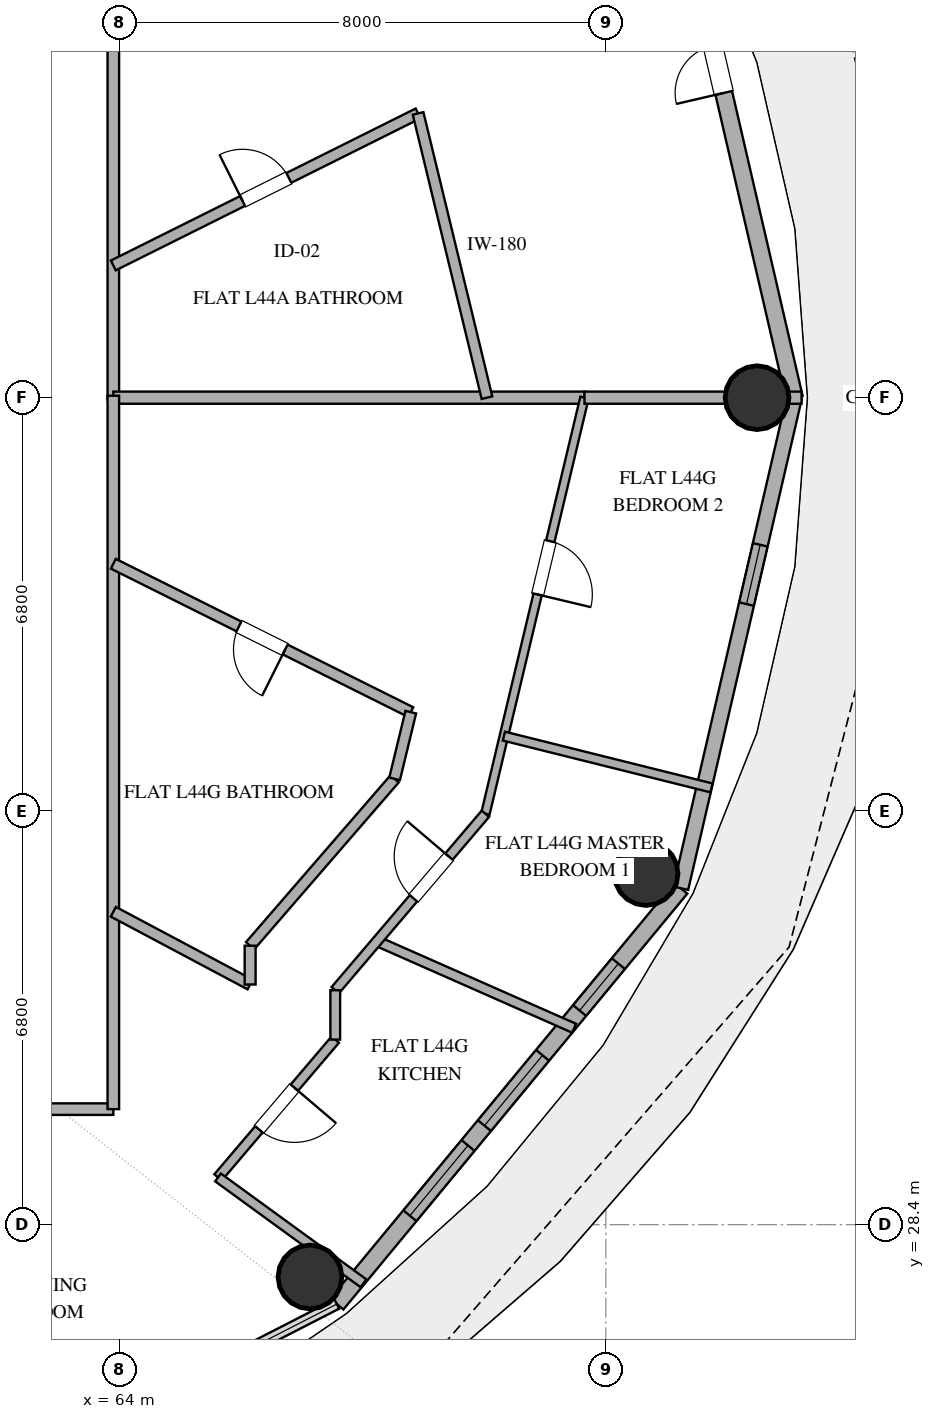
"""IFC4 building model, lengths in metres.
Left out: names, types, materials, properties, quantities, classifications, styles, units other than length and angle.
Written with IfcOpenShell. Run it as: python <this file> out.ifc"""

import sys

from ifc_helpers import new_model, si_unit, direction, frame, frame_2d, origin, origin_2d, place, context, subcontext, project, spatial, rectangle, hollow_circle, extrude, element, fill, save


model = new_model("IFC4")
c1 = context("Model", 3, precision=1e-05, world=origin(), true_north=direction((0.0, 1.0)))
c2 = subcontext(c1, "Body", "Model", "MODEL_VIEW")
j1 = project(units=[si_unit("LENGTHUNIT", "METRE"), si_unit("PLANEANGLEUNIT", "RADIAN")], contexts=[c1])
p1 = place(None, origin())
s1 = spatial("IfcSite", under=j1, at=p1, CompositionType="ELEMENT")
p2 = place(p1, origin())
s2 = spatial("IfcBuilding", under=s1, at=p2, CompositionType="ELEMENT")
p3 = place(p2, frame((0.0, 0.0, 175.8)))
s3 = spatial("IfcBuildingStorey", under=s2, at=p3, CompositionType="ELEMENT", Elevation=175.8)
for number, where, z_axis, x_axis in (
    (1, (74.487, 42.0, 0.0), (0.0, 0.0, 1.0), (1.0, 0.0, 0.0)),
    (2, (67.134, 27.54, 0.0), (0.0, 0.0, 1.0), (1.0, 0.0, 0.0)),
    (3, (72.662, 34.174, 0.0), (0.0, 0.0, 1.0), (1.0, 0.0, 0.0)),
):
    element("IfcColumn", number, at=place(p3, frame(where, z_axis=z_axis, x_axis=x_axis)), inside=s3, PredefinedType="COLUMN", context=c2, shape_type="SweptSolid", body=[
        extrude(hollow_circle(Radius=0.525, WallThickness=0.028, at=origin_2d()), origin(), (0.0, 0.0, 1.0), 3.38),
    ])
p4 = place(p3, frame((75.099, 42.0, 0.0), z_axis=(0.0, 0.0, 1.0), x_axis=(-0.225473184558, 0.974249374157, 0.0)))
e4 = element("IfcWall", 4, at=p4, inside=s3, PredefinedType="SOLIDWALL", context=c2, shape_type="SweptSolid", body=[
    extrude(rectangle(XDim=8.28, YDim=0.28, at=frame_2d((4.14, 0.0))), origin(), (0.0, 0.0, 1.0), 3.38),
])
p5 = place(p4, frame((5.144, 0.0, 0.0)))
e5 = element("IfcOpeningElement", 5, at=p5, cuts=e4, PredefinedType="OPENING", context=c2, shape_type="SweptSolid", body=[
    extrude(rectangle(XDim=1.6, YDim=2.25, at=frame_2d((0.8, 1.125))), frame((0.0, 0.15, 0.0), z_axis=(0.0, -1.0, 0.0), x_axis=(1.0, 0.0, 0.0)), (0.0, 0.0, 1.0), 0.3),
])
p6 = place(p3, frame((67.576, 27.094, 0.0), z_axis=(0.0, 0.0, 1.0), x_axis=(0.637333477683, 0.770588111915, 0.0)))
e6 = element("IfcWall", 6, at=p6, inside=s3, PredefinedType="SOLIDWALL", context=c2, shape_type="SweptSolid", body=[
    extrude(rectangle(XDim=8.875, YDim=0.28, at=frame_2d((4.438, 0.0))), origin(), (0.0, 0.0, 1.0), 3.38),
])
p7 = place(p6, frame((1.885, 0.0, 0.85)))
e7 = element("IfcOpeningElement", 7, at=p7, cuts=e6, PredefinedType="OPENING", context=c2, shape_type="SweptSolid", body=[
    extrude(rectangle(XDim=1.5, YDim=2.0, at=frame_2d((0.75, 1.0))), frame((0.0, 0.15, 0.0), z_axis=(0.0, -1.0, 0.0), x_axis=(1.0, 0.0, 0.0)), (0.0, 0.0, 1.0), 0.3),
])
p8 = place(p6, frame((3.809, 0.0, 0.85)))
e8 = element("IfcOpeningElement", 8, at=p8, cuts=e6, PredefinedType="OPENING", context=c2, shape_type="SweptSolid", body=[
    extrude(rectangle(XDim=1.5, YDim=2.0, at=frame_2d((0.75, 1.0))), frame((0.0, 0.15, 0.0), z_axis=(0.0, -1.0, 0.0), x_axis=(1.0, 0.0, 0.0)), (0.0, 0.0, 1.0), 0.3),
])
p9 = place(p6, frame((6.265, 0.0, 0.85)))
e9 = element("IfcOpeningElement", 9, at=p9, cuts=e6, PredefinedType="OPENING", context=c2, shape_type="SweptSolid", body=[
    extrude(rectangle(XDim=1.0, YDim=1.8, at=frame_2d((0.5, 0.9))), frame((0.0, 0.15, 0.0), z_axis=(0.0, -1.0, 0.0), x_axis=(1.0, 0.0, 0.0)), (0.0, 0.0, 1.0), 0.3),
])
p10 = place(p3, frame((73.232, 33.933, 0.0), z_axis=(0.0, 0.0, 1.0), x_axis=(0.225473184558, 0.974249374157, 0.0)))
e10 = element("IfcWall", 10, at=p10, inside=s3, PredefinedType="SOLIDWALL", context=c2, shape_type="SweptSolid", body=[
    extrude(rectangle(XDim=8.28, YDim=0.25, at=frame_2d((4.14, 0.0))), origin(), (0.0, 0.0, 1.0), 3.38),
])
p11 = place(p10, frame((4.797, 0.0, 0.35)))
e11 = element("IfcOpeningElement", 11, at=p11, cuts=e10, PredefinedType="OPENING", context=c2, shape_type="SweptSolid", body=[
    extrude(rectangle(XDim=1.0, YDim=1.05, at=frame_2d((0.5, 0.525))), frame((0.0, 0.135, 0.0), z_axis=(0.0, -1.0, 0.0), x_axis=(1.0, 0.0, 0.0)), (0.0, 0.0, 1.0), 0.27),
])
p12 = place(p3, frame((44.873, 30.3, 0.0), z_axis=(0.0, 0.0, 1.0), x_axis=(1.0, 0.0, 0.0)))
e12 = element("IfcWall", 12, at=p12, inside=s3, PredefinedType="PARTITIONING", context=c2, shape_type="SweptSolid", body=[
    extrude(rectangle(XDim=19.027, YDim=0.19, at=frame_2d((9.514, 0.0))), origin(), (0.0, 0.0, 1.0), 2.74),
])
p13 = place(p12, frame((5.01, 0.0, 0.0)))
e13 = element("IfcOpeningElement", 13, at=p13, cuts=e12, PredefinedType="OPENING", context=c2, shape_type="SweptSolid", body=[
    extrude(rectangle(XDim=1.0, YDim=2.2, at=frame_2d((0.5, 1.1))), frame((0.0, 0.105, 0.0), z_axis=(0.0, -1.0, 0.0), x_axis=(1.0, 0.0, 0.0)), (0.0, 0.0, 1.0), 0.21),
])
p14 = place(p12, frame((14.504, 0.0, 0.0)))
e14 = element("IfcOpeningElement", 14, at=p14, cuts=e12, PredefinedType="OPENING", context=c2, shape_type="SweptSolid", body=[
    extrude(rectangle(XDim=1.0, YDim=2.2, at=frame_2d((0.5, 1.1))), frame((0.0, 0.105, 0.0), z_axis=(0.0, -1.0, 0.0), x_axis=(1.0, 0.0, 0.0)), (0.0, 0.0, 1.0), 0.21),
])
p15 = place(p3, frame((63.9, 53.7, 0.0), z_axis=(0.0, 0.0, 1.0), x_axis=(0.0, -1.0, 0.0)))
e15 = element("IfcWall", 15, at=p15, inside=s3, PredefinedType="PARTITIONING", context=c2, shape_type="SweptSolid", body=[
    extrude(rectangle(XDim=11.732, YDim=0.19, at=frame_2d((5.866, 0.0))), origin(), (0.0, 0.0, 1.0), 2.74),
])
p16 = place(p15, frame((4.281, 0.0, 0.0)))
e16 = element("IfcOpeningElement", 16, at=p16, cuts=e15, PredefinedType="OPENING", context=c2, shape_type="SweptSolid", body=[
    extrude(rectangle(XDim=1.0, YDim=2.2, at=frame_2d((0.5, 1.1))), frame((0.0, 0.105, 0.0), z_axis=(0.0, -1.0, 0.0), x_axis=(1.0, 0.0, 0.0)), (0.0, 0.0, 1.0), 0.21),
])
p17 = place(p3, frame((63.9, 42.0, 0.0), z_axis=(0.0, 0.0, 1.0), x_axis=(1.0, 0.0, 0.0)))
e17 = element("IfcWall", 17, at=p17, inside=s3, PredefinedType="PARTITIONING", context=c2, shape_type="SweptSolid", body=[
    extrude(rectangle(XDim=7.749, YDim=0.2, at=frame_2d((3.875, 0.0))), origin(), (0.0, 0.0, 1.0), 2.74),
])
p18 = place(p3, frame((63.9, 42.032, 0.0), z_axis=(0.0, 0.0, 1.0), x_axis=(0.0, -1.0, 0.0)))
e18 = element("IfcWall", 18, at=p18, inside=s3, PredefinedType="PARTITIONING", context=c2, shape_type="SweptSolid", body=[
    extrude(rectangle(XDim=11.732, YDim=0.19, at=frame_2d((5.866, 0.0))), origin(), (0.0, 0.0, 1.0), 2.74),
])
p19 = place(p3, frame((71.649, 42.0, 0.0), z_axis=(0.0, 0.0, 1.0), x_axis=(-0.231658068135, -0.972797275627, 0.0)))
e19 = element("IfcWall", 19, at=p19, inside=s3, PredefinedType="PARTITIONING", context=c2, shape_type="SweptSolid", body=[
    extrude(rectangle(XDim=7.034, YDim=0.14, at=frame_2d((3.517, 0.0))), origin(), (0.0, 0.0, 1.0), 2.74),
])
p20 = place(p19, frame((2.427, 0.0, 0.0)))
e20 = element("IfcOpeningElement", 20, at=p20, cuts=e19, PredefinedType="OPENING", context=c2, shape_type="SweptSolid", body=[
    extrude(rectangle(XDim=0.9, YDim=2.1, at=frame_2d((0.45, 1.05))), frame((0.0, 0.08, 0.0), z_axis=(0.0, -1.0, 0.0), x_axis=(1.0, 0.0, 0.0)), (0.0, 0.0, 1.0), 0.16),
])
p21 = place(p3, frame((63.9, 44.175, 0.0), z_axis=(0.0, 0.0, 1.0), x_axis=(0.894853920946, 0.446359115699, 0.0)))
e21 = element("IfcWall", 21, at=p21, inside=s3, PredefinedType="PLUMBINGWALL", context=c2, shape_type="SweptSolid", body=[
    extrude(rectangle(XDim=5.601, YDim=0.18, at=frame_2d((2.801, 0.0))), origin(), (0.0, 0.0, 1.0), 2.74),
])
p22 = place(p21, frame((2.375, 0.0, 0.0)))
e22 = element("IfcOpeningElement", 22, at=p22, cuts=e21, PredefinedType="OPENING", context=c2, shape_type="SweptSolid", body=[
    extrude(rectangle(XDim=0.85, YDim=2.1, at=frame_2d((0.425, 1.05))), frame((0.0, 0.1, 0.0), z_axis=(0.0, -1.0, 0.0), x_axis=(1.0, 0.0, 0.0)), (0.0, 0.0, 1.0), 0.2),
])
p23 = place(p3, frame((68.792, 36.828, 0.0), z_axis=(0.0, 0.0, 1.0), x_axis=(-0.894873333185, 0.44632019622, 0.0)))
e23 = element("IfcWall", 23, at=p23, inside=s3, PredefinedType="PLUMBINGWALL", context=c2, shape_type="SweptSolid", body=[
    extrude(rectangle(XDim=5.467, YDim=0.18, at=frame_2d((2.733, 0.0))), origin(), (0.0, 0.0, 1.0), 2.74),
])
p24 = place(p23, frame((2.308, 0.0, 0.0)))
e24 = element("IfcOpeningElement", 24, at=p24, cuts=e23, PredefinedType="OPENING", context=c2, shape_type="SweptSolid", body=[
    extrude(rectangle(XDim=0.85, YDim=2.1, at=frame_2d((0.425, 1.05))), frame((0.0, 0.1, 0.0), z_axis=(0.0, -1.0, 0.0), x_axis=(1.0, 0.0, 0.0)), (0.0, 0.0, 1.0), 0.2),
])
p25 = place(p3, frame((68.912, 46.675, 0.0), z_axis=(0.0, 0.0, 1.0), x_axis=(0.235459111302, -0.97188425592, 0.0)))
e25 = element("IfcWall", 25, at=p25, inside=s3, PredefinedType="PLUMBINGWALL", context=c2, shape_type="SweptSolid", body=[
    extrude(rectangle(XDim=4.81, YDim=0.18, at=frame_2d((2.405, 0.0))), origin(), (0.0, 0.0, 1.0), 2.74),
])
p26 = place(p3, frame((66.15, 32.987, 0.0), z_axis=(0.0, 0.0, 1.0), x_axis=(0.654577130551, 0.755995224958, 0.0)))
e26 = element("IfcWall", 26, at=p26, inside=s3, PredefinedType="PLUMBINGWALL", context=c2, shape_type="SweptSolid", body=[
    extrude(rectangle(XDim=3.63, YDim=0.18, at=frame_2d((1.815, 0.0))), origin(), (0.0, 0.0, 1.0), 2.74),
])
p27 = place(p3, frame((71.649, 42.0, 0.0), z_axis=(0.0, 0.0, 1.0), x_axis=(1.0, 0.0, 0.0)))
e27 = element("IfcWall", 27, at=p27, inside=s3, PredefinedType="PARTITIONING", context=c2, shape_type="SweptSolid", body=[
    extrude(rectangle(XDim=3.571, YDim=0.2, at=frame_2d((1.785, 0.0))), origin(), (0.0, 0.0, 1.0), 2.74),
])
p28 = place(p3, frame((71.478, 31.63, 0.0), z_axis=(0.0, 0.0, 1.0), x_axis=(-0.914752340799, 0.40401504304, 0.0)))
e28 = element("IfcWall", 28, at=p28, inside=s3, PredefinedType="PLUMBINGWALL", context=c2, shape_type="SweptSolid", body=[
    extrude(rectangle(XDim=3.543, YDim=0.16, at=frame_2d((1.772, 0.0))), origin(), (0.0, 0.0, 1.0), 2.74),
])
p29 = place(p3, frame((70.323, 36.434, 0.0), z_axis=(0.0, 0.0, 1.0), x_axis=(0.970301483456, -0.241898803642, 0.0)))
e29 = element("IfcWall", 29, at=p29, inside=s3, PredefinedType="PARTITIONING", context=c2, shape_type="SweptSolid", body=[
    extrude(rectangle(XDim=3.518, YDim=0.15, at=frame_2d((1.759, 0.0))), origin(), (0.0, 0.0, 1.0), 2.74),
])
p30 = place(p3, frame((67.55, 31.443, 0.0), z_axis=(0.0, 0.0, 1.0), x_axis=(-0.647915118337, -0.761712543832, 0.0)))
e30 = element("IfcWall", 30, at=p30, inside=s3, PredefinedType="PLUMBINGWALL", context=c2, shape_type="SweptSolid", body=[
    extrude(rectangle(XDim=2.976, YDim=0.16, at=frame_2d((1.488, 0.0))), origin(), (0.0, 0.0, 1.0), 2.74),
])
p31 = place(p30, frame((1.038, 0.0, 0.0)))
e31 = element("IfcOpeningElement", 31, at=p31, cuts=e30, PredefinedType="OPENING", context=c2, shape_type="SweptSolid", body=[
    extrude(rectangle(XDim=0.9, YDim=2.1, at=frame_2d((0.45, 1.05))), frame((0.0, 0.09, 0.0), z_axis=(0.0, -1.0, 0.0), x_axis=(1.0, 0.0, 0.0)), (0.0, 0.0, 1.0), 0.18),
])
p32 = place(p3, frame((65.622, 29.177, 0.0), z_axis=(0.0, 0.0, 1.0), x_axis=(0.808600464561, -0.588358129638, 0.0)))
e32 = element("IfcWall", 32, at=p32, inside=s3, PredefinedType="PLUMBINGWALL", context=c2, shape_type="SweptSolid", body=[
    extrude(rectangle(XDim=2.958, YDim=0.16, at=frame_2d((1.479, 0.0))), origin(), (0.0, 0.0, 1.0), 2.74),
])
p33 = place(p3, frame((67.55, 32.256, 0.0), z_axis=(0.0, 0.0, 1.0), x_axis=(0.648059335437, 0.761589848773, 0.0)))
e33 = element("IfcWall", 33, at=p33, inside=s3, PredefinedType="PLUMBINGWALL", context=c2, shape_type="SweptSolid", body=[
    extrude(rectangle(XDim=3.811, YDim=0.16, at=frame_2d((1.905, 0.0))), origin(), (0.0, 0.0, 1.0), 2.74),
])
p34 = place(p33, frame((1.985, 0.0, 0.0)))
e34 = element("IfcOpeningElement", 34, at=p34, cuts=e33, PredefinedType="OPENING", context=c2, shape_type="SweptSolid", body=[
    extrude(rectangle(XDim=0.9, YDim=2.1, at=frame_2d((0.45, 1.05))), frame((0.0, 0.09, 0.0), z_axis=(0.0, -1.0, 0.0), x_axis=(1.0, 0.0, 0.0)), (0.0, 0.0, 1.0), 0.18),
])
p35 = place(p3, frame((63.9, 33.546, 0.0), z_axis=(0.0, 0.0, 1.0), x_axis=(0.882956890564, -0.469454075929, 0.0)))
e35 = element("IfcWall", 35, at=p35, inside=s3, PredefinedType="PLUMBINGWALL", context=c2, shape_type="SweptSolid", body=[
    extrude(rectangle(XDim=2.548, YDim=0.18, at=frame_2d((1.274, 0.0))), origin(), (0.0, 0.0, 1.0), 2.74),
])
p36 = place(p3, frame((68.526, 35.732, 0.0), z_axis=(0.0, 0.0, 1.0), x_axis=(0.235606217796, 0.971848604535, 0.0)))
e36 = element("IfcWall", 36, at=p36, inside=s3, PredefinedType="PLUMBINGWALL", context=c2, shape_type="SweptSolid", body=[
    extrude(rectangle(XDim=1.128, YDim=0.18, at=frame_2d((0.564, 0.0))), origin(), (0.0, 0.0, 1.0), 2.74),
])
p37 = place(p3, frame((67.55, 32.256, 0.0), z_axis=(0.0, 0.0, 1.0), x_axis=(0.0, -1.0, 0.0)))
e37 = element("IfcWall", 37, at=p37, inside=s3, PredefinedType="PLUMBINGWALL", context=c2, shape_type="SweptSolid", body=[
    extrude(rectangle(XDim=0.812, YDim=0.16, at=frame_2d((0.406, 0.0))), origin(), (0.0, 0.0, 1.0), 2.74),
])
p38 = place(p3, frame((66.15, 32.35, 0.0), z_axis=(0.0, 0.0, 1.0), x_axis=(0.0, 1.0, 0.0)))
e38 = element("IfcWall", 38, at=p38, inside=s3, PredefinedType="PLUMBINGWALL", context=c2, shape_type="SweptSolid", body=[
    extrude(rectangle(XDim=0.638, YDim=0.18, at=frame_2d((0.319, 0.0))), origin(), (0.0, 0.0, 1.0), 2.74),
])
p39 = place(p5, origin())
e39 = element("IfcDoor", 39, at=p39, inside=s3, OperationType="DOUBLE_DOOR_SINGLE_SWING", PredefinedType="DOOR", context=c2, shape_type="SweptSolid", body=[
    extrude(rectangle(XDim=1.6, YDim=2.25, at=frame_2d((0.8, 1.125))), frame((0.0, 0.025, 0.0), z_axis=(0.0, -1.0, 0.0), x_axis=(1.0, 0.0, 0.0)), (0.0, 0.0, 1.0), 0.05),
])
fill(e5, e39)
p40 = place(p7, origin())
e40 = element("IfcWindow", 40, at=p40, inside=s3, PartitioningType="SINGLE_PANEL", PredefinedType="WINDOW", context=c2, shape_type="SweptSolid", body=[
    extrude(rectangle(XDim=1.5, YDim=2.0, at=frame_2d((0.75, 1.0))), frame((0.0, 0.03, 0.0), z_axis=(0.0, -1.0, 0.0), x_axis=(1.0, 0.0, 0.0)), (0.0, 0.0, 1.0), 0.06),
])
fill(e7, e40)
p41 = place(p8, origin())
e41 = element("IfcWindow", 41, at=p41, inside=s3, PartitioningType="SINGLE_PANEL", PredefinedType="WINDOW", context=c2, shape_type="SweptSolid", body=[
    extrude(rectangle(XDim=1.5, YDim=2.0, at=frame_2d((0.75, 1.0))), frame((0.0, 0.03, 0.0), z_axis=(0.0, -1.0, 0.0), x_axis=(1.0, 0.0, 0.0)), (0.0, 0.0, 1.0), 0.06),
])
fill(e8, e41)
p42 = place(p9, origin())
e42 = element("IfcWindow", 42, at=p42, inside=s3, PartitioningType="SINGLE_PANEL", PredefinedType="WINDOW", context=c2, shape_type="SweptSolid", body=[
    extrude(rectangle(XDim=1.0, YDim=1.8, at=frame_2d((0.5, 0.9))), frame((0.0, 0.03, 0.0), z_axis=(0.0, -1.0, 0.0), x_axis=(1.0, 0.0, 0.0)), (0.0, 0.0, 1.0), 0.06),
])
fill(e9, e42)
p43 = place(p11, origin())
e43 = element("IfcWindow", 43, at=p43, inside=s3, PartitioningType="SINGLE_PANEL", PredefinedType="WINDOW", context=c2, shape_type="SweptSolid", body=[
    extrude(rectangle(XDim=1.0, YDim=1.05, at=frame_2d((0.5, 0.525))), frame((0.0, 0.03, 0.0), z_axis=(0.0, -1.0, 0.0), x_axis=(1.0, 0.0, 0.0)), (0.0, 0.0, 1.0), 0.06),
])
fill(e11, e43)
p44 = place(p20, origin())
e44 = element("IfcDoor", 44, at=p44, inside=s3, OperationType="SINGLE_SWING_RIGHT", PredefinedType="DOOR", context=c2, shape_type="SweptSolid", body=[
    extrude(rectangle(XDim=0.9, YDim=2.1, at=frame_2d((0.45, 1.05))), frame((0.0, 0.025, 0.0), z_axis=(0.0, -1.0, 0.0), x_axis=(1.0, 0.0, 0.0)), (0.0, 0.0, 1.0), 0.05),
])
fill(e20, e44)
p45 = place(p22, origin())
e45 = element("IfcDoor", 45, at=p45, inside=s3, OperationType="SINGLE_SWING_LEFT", PredefinedType="DOOR", context=c2, shape_type="SweptSolid", body=[
    extrude(rectangle(XDim=0.85, YDim=2.1, at=frame_2d((0.425, 1.05))), frame((0.0, 0.025, 0.0), z_axis=(0.0, -1.0, 0.0), x_axis=(1.0, 0.0, 0.0)), (0.0, 0.0, 1.0), 0.05),
])
fill(e22, e45)
p46 = place(p24, origin())
e46 = element("IfcDoor", 46, at=p46, inside=s3, OperationType="SINGLE_SWING_LEFT", PredefinedType="DOOR", context=c2, shape_type="SweptSolid", body=[
    extrude(rectangle(XDim=0.85, YDim=2.1, at=frame_2d((0.425, 1.05))), frame((0.0, 0.025, 0.0), z_axis=(0.0, -1.0, 0.0), x_axis=(1.0, 0.0, 0.0)), (0.0, 0.0, 1.0), 0.05),
])
fill(e24, e46)
p47 = place(p31, origin())
e47 = element("IfcDoor", 47, at=p47, inside=s3, OperationType="SINGLE_SWING_LEFT", PredefinedType="DOOR", context=c2, shape_type="SweptSolid", body=[
    extrude(rectangle(XDim=0.9, YDim=2.1, at=frame_2d((0.45, 1.05))), frame((0.0, 0.025, 0.0), z_axis=(0.0, -1.0, 0.0), x_axis=(1.0, 0.0, 0.0)), (0.0, 0.0, 1.0), 0.05),
])
fill(e31, e47)
p48 = place(p34, origin())
e48 = element("IfcDoor", 48, at=p48, inside=s3, OperationType="SINGLE_SWING_RIGHT", PredefinedType="DOOR", context=c2, shape_type="SweptSolid", body=[
    extrude(rectangle(XDim=0.9, YDim=2.1, at=frame_2d((0.45, 1.05))), frame((0.0, 0.025, 0.0), z_axis=(0.0, -1.0, 0.0), x_axis=(1.0, 0.0, 0.0)), (0.0, 0.0, 1.0), 0.05),
])
fill(e34, e48)
save(model, sys.argv[1])
